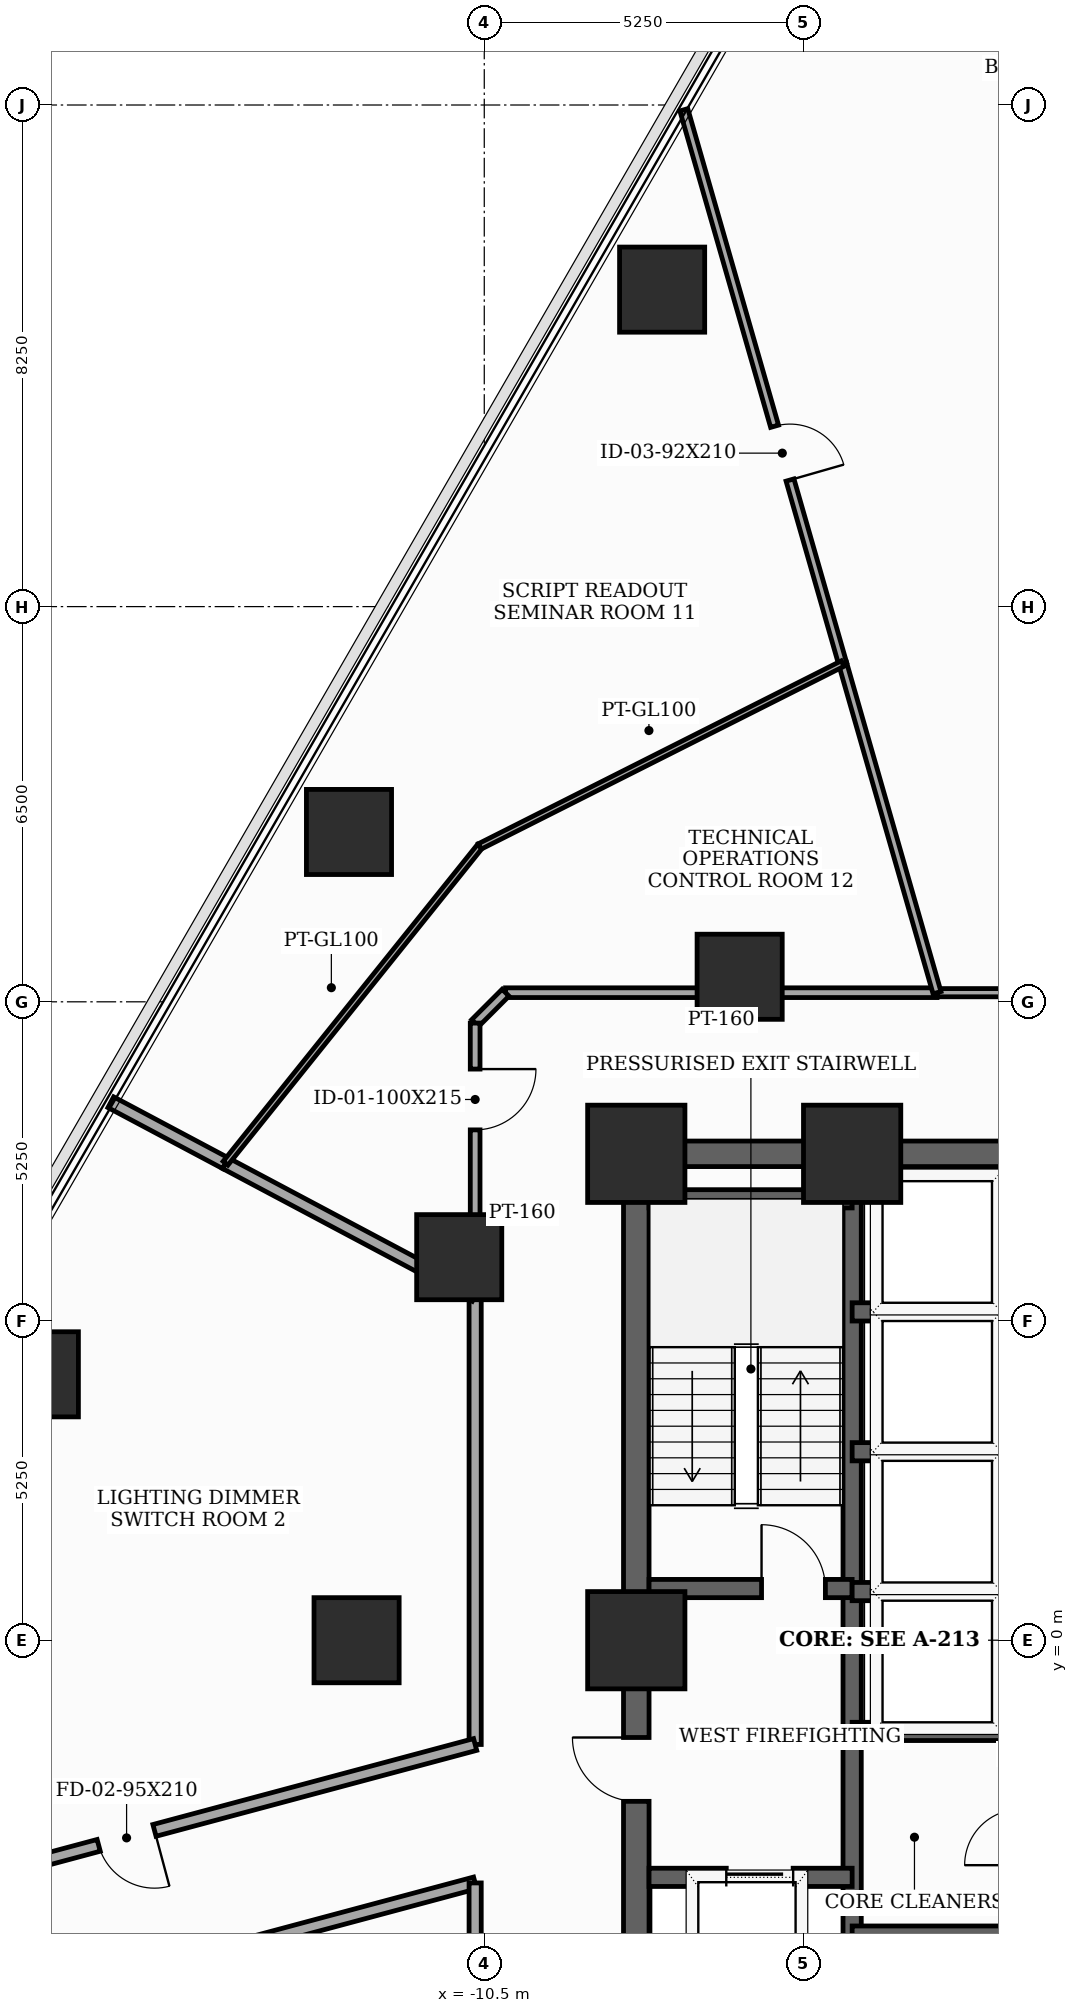
"""IFC4 building model, lengths in metres.
Left out: names, types, materials, properties, quantities, classifications, styles, units other than length and angle.
Written with IfcOpenShell. Run it as: python <this file> out.ifc"""

import sys

from ifc_helpers import new_model, si_unit, direction, frame, frame_2d, origin, origin_2d, place, context, subcontext, project, spatial, rectangle, extrude, element, fill, save


model = new_model("IFC4")
c1 = context("Model", 3, precision=1e-05, world=origin(), true_north=direction((0.0, 1.0)))
c2 = subcontext(c1, "Body", "Model", "MODEL_VIEW")
j1 = project(units=[si_unit("LENGTHUNIT", "METRE"), si_unit("PLANEANGLEUNIT", "RADIAN")], contexts=[c1])
p1 = place(None, origin())
s1 = spatial("IfcSite", under=j1, at=p1, CompositionType="ELEMENT")
p2 = place(p1, origin())
s2 = spatial("IfcBuilding", under=s1, at=p2, CompositionType="ELEMENT")
p3 = place(p2, frame((0.0, 0.0, 40.8)))
s3 = spatial("IfcBuildingStorey", under=s2, at=p3, CompositionType="ELEMENT", Elevation=40.8)
for number, where, z_axis, x_axis in (
    (1, (-4.45, 8.0, 0.0), (0.0, 0.0, 1.0), (1.0, 0.0, 0.0)),
    (2, (-8.0, 8.0, 0.0), (0.0, 0.0, 1.0), (1.0, 0.0, 0.0)),
    (3, (-8.0, 0.0, 0.0), (0.0, 0.0, 1.0), (1.0, 0.0, 0.0)),
):
    element("IfcColumn", number, at=place(p3, frame(where, z_axis=z_axis, x_axis=x_axis)), inside=s3, PredefinedType="COLUMN", context=c2, shape_type="SweptSolid", body=[
        extrude(rectangle(XDim=1.6, YDim=1.6, at=origin_2d()), origin(), (0.0, 0.0, 1.0), 3.7),
    ])
for number, where, z_axis, x_axis in (
    (4, (-6.3, 10.912, 0.0), (0.0, 0.0, 1.0), (1.0, 0.0, 0.0)),
    (5, (-10.912, 6.3, 0.0), (0.0, 0.0, 1.0), (1.0, 0.0, 0.0)),
    (6, (-12.6, 0.0, 0.0), (0.0, 0.0, 1.0), (1.0, 0.0, 0.0)),
    (7, (-7.575, 22.213, 0.0), (0.0, 0.0, 1.0), (1.0, 0.0, 0.0)),
    (8, (-12.725, 13.293, 0.0), (0.0, 0.0, 1.0), (1.0, 0.0, 0.0)),
    (9, (-17.875, 4.373, 0.0), (0.0, 0.0, 1.0), (1.0, 0.0, 0.0)),
):
    element("IfcColumn", number, at=place(p3, frame(where, z_axis=z_axis, x_axis=x_axis)), inside=s3, PredefinedType="COLUMN", context=c2, shape_type="SweptSolid", body=[
        extrude(rectangle(XDim=1.4, YDim=1.4, at=origin_2d()), origin(), (0.0, 0.0, 1.0), 3.7),
    ])
p4 = place(p3, frame((-8.0, -8.0, 0.0), z_axis=(0.0, 0.0, 1.0), x_axis=(0.0, 1.0, 0.0)))
e10 = element("IfcWall", 10, at=p4, inside=s3, PredefinedType="SHEAR", context=c2, shape_type="SweptSolid", body=[
    extrude(rectangle(XDim=16.0, YDim=0.42, at=frame_2d((8.0, 0.0))), origin(), (0.0, 0.0, 1.0), 3.5),
])
p5 = place(p4, frame((1.002, 0.0, 0.0)))
e11 = element("IfcOpeningElement", 11, at=p5, cuts=e10, PredefinedType="OPENING", context=c2, shape_type="SweptSolid", body=[
    extrude(rectangle(XDim=0.85, YDim=2.02, at=frame_2d((0.425, 1.01))), frame((0.0, 0.22, 0.0), z_axis=(0.0, -1.0, 0.0), x_axis=(1.0, 0.0, 0.0)), (0.0, 0.0, 1.0), 0.44),
])
p6 = place(p4, frame((5.35, 0.0, 0.0)))
e12 = element("IfcOpeningElement", 12, at=p6, cuts=e10, PredefinedType="OPENING", context=c2, shape_type="SweptSolid", body=[
    extrude(rectangle(XDim=1.05, YDim=2.15, at=frame_2d((0.525, 1.075))), frame((0.0, 0.22, 0.0), z_axis=(0.0, -1.0, 0.0), x_axis=(1.0, 0.0, 0.0)), (0.0, 0.0, 1.0), 0.44),
])
p7 = place(p3, frame((-8.0, 8.0, 0.0), z_axis=(0.0, 0.0, 1.0), x_axis=(1.0, 0.0, 0.0)))
e13 = element("IfcWall", 13, at=p7, inside=s3, PredefinedType="SHEAR", context=c2, shape_type="SweptSolid", body=[
    extrude(rectangle(XDim=16.0, YDim=0.42, at=frame_2d((8.0, 0.0))), origin(), (0.0, 0.0, 1.0), 3.5),
])
p8 = place(p7, frame((7.1, 0.0, 0.0)))
e14 = element("IfcOpeningElement", 14, at=p8, cuts=e13, PredefinedType="OPENING", context=c2, shape_type="SweptSolid", body=[
    extrude(rectangle(XDim=1.8, YDim=2.15, at=frame_2d((0.9, 1.075))), frame((0.0, 0.22, 0.0), z_axis=(0.0, -1.0, 0.0), x_axis=(1.0, 0.0, 0.0)), (0.0, 0.0, 1.0), 0.44),
])
p9 = place(p3, frame((-4.45, -7.79, 0.0), z_axis=(0.0, 0.0, 1.0), x_axis=(0.0, 1.0, 0.0)))
e15 = element("IfcWall", 15, at=p9, inside=s3, PredefinedType="SHEAR", context=c2, shape_type="SweptSolid", body=[
    extrude(rectangle(XDim=15.58, YDim=0.3, at=frame_2d((7.79, 0.0))), origin(), (0.0, 0.0, 1.0), 3.5),
])
p10 = place(p3, frame((-7.79, 0.85, 0.0), z_axis=(0.0, 0.0, 1.0), x_axis=(1.0, 0.0, 0.0)))
e16 = element("IfcWall", 16, at=p10, inside=s3, PredefinedType="SHEAR", context=c2, shape_type="SweptSolid", body=[
    extrude(rectangle(XDim=3.34, YDim=0.3, at=frame_2d((1.67, 0.0))), origin(), (0.0, 0.0, 1.0), 3.5),
])
p11 = place(p10, frame((1.85, 0.0, 0.0)))
e17 = element("IfcOpeningElement", 17, at=p11, cuts=e16, PredefinedType="OPENING", context=c2, shape_type="SweptSolid", body=[
    extrude(rectangle(XDim=1.05, YDim=2.15, at=frame_2d((0.525, 1.075))), frame((0.0, 0.16, 0.0), z_axis=(0.0, -1.0, 0.0), x_axis=(1.0, 0.0, 0.0)), (0.0, 0.0, 1.0), 0.32),
])
p12 = place(p3, frame((-7.79, 7.26, 0.0), z_axis=(0.0, 0.0, 1.0), x_axis=(1.0, 0.0, 0.0)))
e18 = element("IfcWall", 18, at=p12, inside=s3, PredefinedType="SHEAR", context=c2, shape_type="SweptSolid", body=[
    extrude(rectangle(XDim=3.34, YDim=0.3, at=frame_2d((1.67, 0.0))), origin(), (0.0, 0.0, 1.0), 3.5),
])
p13 = place(p3, frame((-7.79, -3.9, 0.0), z_axis=(0.0, 0.0, 1.0), x_axis=(1.0, 0.0, 0.0)))
e19 = element("IfcWall", 19, at=p13, inside=s3, PredefinedType="SHEAR", context=c2, shape_type="SweptSolid", body=[
    extrude(rectangle(XDim=3.34, YDim=0.3, at=frame_2d((1.67, 0.0))), origin(), (0.0, 0.0, 1.0), 3.5),
])
p14 = place(p13, frame((1.27, 0.0, 0.0)))
e20 = element("IfcOpeningElement", 20, at=p14, cuts=e19, PredefinedType="OPENING", context=c2, shape_type="SweptSolid", body=[
    extrude(rectangle(XDim=1.1, YDim=2.1, at=frame_2d((0.55, 1.05))), frame((0.0, 0.16, 0.0), z_axis=(0.0, -1.0, 0.0), x_axis=(1.0, 0.0, 0.0)), (0.0, 0.0, 1.0), 0.32),
])
p15 = place(p3, frame((-4.45, -4.85, 0.0), z_axis=(0.0, 0.0, 1.0), x_axis=(1.0, 0.0, 0.0)))
e21 = element("IfcWall", 21, at=p15, inside=s3, PredefinedType="SHEAR", context=c2, shape_type="SweptSolid", body=[
    extrude(rectangle(XDim=8.9, YDim=0.3, at=frame_2d((4.45, 0.0))), origin(), (0.0, 0.0, 1.0), 3.5),
])
for number, where, z_axis, x_axis in (
    (22, (-4.45, -1.5, 0.0), (0.0, 0.0, 1.0), (1.0, 0.0, 0.0)),
    (23, (-4.45, 0.8, 0.0), (0.0, 0.0, 1.0), (1.0, 0.0, 0.0)),
    (24, (-4.45, 3.1, 0.0), (0.0, 0.0, 1.0), (1.0, 0.0, 0.0)),
    (25, (-4.45, 5.4, 0.0), (0.0, 0.0, 1.0), (1.0, 0.0, 0.0)),
):
    element("IfcWall", number, at=place(p3, frame(where, z_axis=z_axis, x_axis=x_axis)), inside=s3, PredefinedType="SHEAR", context=c2, shape_type="SweptSolid", body=[
        extrude(rectangle(XDim=2.77, YDim=0.3, at=frame_2d((1.385, 0.0))), origin(), (0.0, 0.0, 1.0), 3.5),
    ])
p16 = place(p3, frame((1.715, 10.65, 0.0), z_axis=(0.0, 0.0, 1.0), x_axis=(-1.0, 0.0, 0.0)))
e26 = element("IfcWall", 26, at=p16, inside=s3, PredefinedType="PARTITIONING", context=c2, shape_type="SweptSolid", body=[
    extrude(rectangle(XDim=4.769, YDim=0.135, at=frame_2d((2.385, 0.0))), origin(), (0.0, 0.0, 1.0), 2.785),
])
p17 = place(p3, frame((-10.65, 5.663, 0.0), z_axis=(0.0, 0.0, 1.0), x_axis=(0.0, -1.0, 0.0)))
e27 = element("IfcWall", 27, at=p17, inside=s3, PredefinedType="SOLIDWALL", context=c2, shape_type="SweptSolid", body=[
    extrude(rectangle(XDim=7.378, YDim=0.2, at=frame_2d((3.689, 0.0))), origin(), (0.0, 0.0, 1.0), 2.785),
])
p18 = place(p3, frame((-10.65, -1.715, 0.0), z_axis=(0.0, 0.0, 1.0), x_axis=(-0.965926659449, -0.258815935688, 0.0)))
e28 = element("IfcWall", 28, at=p18, inside=s3, PredefinedType="SOLIDWALL", context=c2, shape_type="SweptSolid", body=[
    extrude(rectangle(XDim=11.87, YDim=0.2, at=frame_2d((5.935, 0.0))), origin(), (0.0, 0.0, 1.0), 2.785),
])
p19 = place(p18, frame((5.46, 0.0, 0.0)))
e29 = element("IfcOpeningElement", 29, at=p19, cuts=e28, PredefinedType="OPENING", context=c2, shape_type="SweptSolid", body=[
    extrude(rectangle(XDim=0.95, YDim=2.1, at=frame_2d((0.475, 1.05))), frame((0.0, 0.11, 0.0), z_axis=(0.0, -1.0, 0.0), x_axis=(1.0, 0.0, 0.0)), (0.0, 0.0, 1.0), 0.22),
])
p20 = place(p3, frame((-21.545, -6.912, 0.0), z_axis=(0.0, 0.0, 1.0), x_axis=(0.965906888357, 0.258889712088, 0.0)))
e30 = element("IfcWall", 30, at=p20, inside=s3, PredefinedType="SOLIDWALL", context=c2, shape_type="SweptSolid", body=[
    extrude(rectangle(XDim=11.28, YDim=0.2, at=frame_2d((5.64, 0.0))), origin(), (0.0, 0.0, 1.0), 2.785),
])
p21 = place(p3, frame((-10.65, -3.992, 0.0), z_axis=(0.0, 0.0, 1.0), x_axis=(0.0, -1.0, 0.0)))
e31 = element("IfcWall", 31, at=p21, inside=s3, PredefinedType="SOLIDWALL", context=c2, shape_type="SweptSolid", body=[
    extrude(rectangle(XDim=3.746, YDim=0.2, at=frame_2d((1.873, 0.0))), origin(), (0.0, 0.0, 1.0), 2.785),
])
p22 = place(p3, frame((-3.054, 10.65, 0.0), z_axis=(0.0, 0.0, 1.0), x_axis=(-1.0, 0.0, 0.0)))
e32 = element("IfcWall", 32, at=p22, inside=s3, PredefinedType="PARTITIONING", context=c2, shape_type="SweptSolid", body=[
    extrude(rectangle(XDim=7.096, YDim=0.16, at=frame_2d((3.548, 0.0))), origin(), (0.0, 0.0, 1.0), 2.685),
])
p23 = place(p3, frame((-10.15, 10.65, 0.0), z_axis=(0.0, 0.0, 1.0), x_axis=(-0.707106781187, -0.707106781187, 0.0)))
e33 = element("IfcWall", 33, at=p23, inside=s3, PredefinedType="PARTITIONING", context=c2, shape_type="SweptSolid", body=[
    extrude(rectangle(XDim=0.707, YDim=0.16, at=frame_2d((0.354, 0.0))), origin(), (0.0, 0.0, 1.0), 3.5),
])
p24 = place(p3, frame((-10.65, 10.15, 0.0), z_axis=(0.0, 0.0, 1.0), x_axis=(0.0, -1.0, 0.0)))
e34 = element("IfcWall", 34, at=p24, inside=s3, PredefinedType="PARTITIONING", context=c2, shape_type="SweptSolid", body=[
    extrude(rectangle(XDim=4.487, YDim=0.16, at=frame_2d((2.243, 0.0))), origin(), (0.0, 0.0, 1.0), 2.785),
])
p25 = place(p24, frame((0.756, 0.0, 0.0)))
e35 = element("IfcOpeningElement", 35, at=p25, cuts=e34, PredefinedType="OPENING", context=c2, shape_type="SweptSolid", body=[
    extrude(rectangle(XDim=1.0, YDim=2.15, at=frame_2d((0.5, 1.075))), frame((0.0, 0.09, 0.0), z_axis=(0.0, -1.0, 0.0), x_axis=(1.0, 0.0, 0.0)), (0.0, 0.0, 1.0), 0.18),
])
p26 = place(p3, frame((-7.218, 25.171, 0.0), z_axis=(0.0, 0.0, 1.0), x_axis=(0.275694254482, -0.961245378686, 0.0)))
e36 = element("IfcWall", 36, at=p26, inside=s3, PredefinedType="PARTITIONING", context=c2, shape_type="SweptSolid", body=[
    extrude(rectangle(XDim=9.475, YDim=0.135, at=frame_2d((4.738, 0.0))), origin(), (0.0, 0.0, 1.0), 2.935),
])
p27 = place(p26, frame((5.415, 0.0, 0.0)))
e37 = element("IfcOpeningElement", 37, at=p27, cuts=e36, PredefinedType="OPENING", context=c2, shape_type="SweptSolid", body=[
    extrude(rectangle(XDim=0.92, YDim=2.1, at=frame_2d((0.46, 1.05))), frame((0.0, 0.077, 0.0), z_axis=(0.0, -1.0, 0.0), x_axis=(1.0, 0.0, 0.0)), (0.0, 0.0, 1.0), 0.155),
])
p28 = place(p3, frame((-4.606, 16.063, 0.0), z_axis=(0.0, 0.0, 1.0), x_axis=(0.275608564, -0.961269951392, 0.0)))
e38 = element("IfcWall", 38, at=p28, inside=s3, PredefinedType="PARTITIONING", context=c2, shape_type="SweptSolid", body=[
    extrude(rectangle(XDim=5.631, YDim=0.135, at=frame_2d((2.815, 0.0))), origin(), (0.0, 0.0, 1.0), 2.785),
])
p29 = place(p3, frame((-14.755, 7.845, 0.0), z_axis=(0.0, 0.0, 1.0), x_axis=(-0.882905636776, 0.469550462197, 0.0)))
e39 = element("IfcWall", 39, at=p29, inside=s3, PredefinedType="SOLIDWALL", context=c2, shape_type="SweptSolid", body=[
    extrude(rectangle(XDim=2.137, YDim=0.2, at=frame_2d((1.069, 0.0))), origin(), (0.0, 0.0, 1.0), 2.935),
])
p30 = place(p3, frame((-10.65, 5.663, 0.0), z_axis=(0.0, 0.0, 1.0), x_axis=(-0.883016425854, 0.46934208385, 0.0)))
e40 = element("IfcWall", 40, at=p30, inside=s3, PredefinedType="SOLIDWALL", context=c2, shape_type="SweptSolid", body=[
    extrude(rectangle(XDim=4.649, YDim=0.2, at=frame_2d((2.324, 0.0))), origin(), (0.0, 0.0, 1.0), 2.785),
])
p31 = place(p3, frame((-14.755, 7.845, 0.0), z_axis=(0.0, 0.0, 1.0), x_axis=(0.625893000506, 0.779908938222, 0.0)))
e41 = element("IfcWall", 41, at=p31, inside=s3, PredefinedType="MOVABLE", context=c2, shape_type="SweptSolid", body=[
    extrude(rectangle(XDim=6.681, YDim=0.1, at=frame_2d((3.341, 0.0))), origin(), (0.0, 0.0, 1.0), 2.685),
])
p32 = place(p3, frame((-10.573, 13.056, 0.0), z_axis=(0.0, 0.0, 1.0), x_axis=(0.893012396789, 0.450032064615, 0.0)))
e42 = element("IfcWall", 42, at=p32, inside=s3, PredefinedType="MOVABLE", context=c2, shape_type="SweptSolid", body=[
    extrude(rectangle(XDim=6.682, YDim=0.1, at=frame_2d((3.341, 0.0))), origin(), (0.0, 0.0, 1.0), 2.685),
])
p33 = place(p6, origin())
e43 = element("IfcDoor", 43, at=p33, inside=s3, OperationType="SINGLE_SWING_RIGHT", PredefinedType="DOOR", context=c2, shape_type="SweptSolid", body=[
    extrude(rectangle(XDim=1.05, YDim=2.15, at=frame_2d((0.525, 1.075))), frame((0.0, 0.025, 0.0), z_axis=(0.0, -1.0, 0.0), x_axis=(1.0, 0.0, 0.0)), (0.0, 0.0, 1.0), 0.05),
])
fill(e12, e43)
p34 = place(p11, origin())
e44 = element("IfcDoor", 44, at=p34, inside=s3, OperationType="SINGLE_SWING_LEFT", PredefinedType="DOOR", context=c2, shape_type="SweptSolid", body=[
    extrude(rectangle(XDim=1.05, YDim=2.15, at=frame_2d((0.525, 1.075))), frame((0.0, 0.025, 0.0), z_axis=(0.0, -1.0, 0.0), x_axis=(1.0, 0.0, 0.0)), (0.0, 0.0, 1.0), 0.05),
])
fill(e17, e44)
p35 = place(p14, origin())
e45 = element("IfcDoor", 45, at=p35, inside=s3, OperationType="SLIDING_TO_LEFT", PredefinedType="DOOR", context=c2, shape_type="SweptSolid", body=[
    extrude(rectangle(XDim=1.1, YDim=2.1, at=frame_2d((0.55, 1.05))), frame((0.0, 0.025, 0.0), z_axis=(0.0, -1.0, 0.0), x_axis=(1.0, 0.0, 0.0)), (0.0, 0.0, 1.0), 0.05),
])
fill(e20, e45)
p36 = place(p19, origin())
e46 = element("IfcDoor", 46, at=p36, inside=s3, OperationType="SINGLE_SWING_LEFT", PredefinedType="DOOR", context=c2, shape_type="SweptSolid", body=[
    extrude(rectangle(XDim=0.95, YDim=2.1, at=frame_2d((0.475, 1.05))), frame((0.0, 0.025, 0.0), z_axis=(0.0, -1.0, 0.0), x_axis=(1.0, 0.0, 0.0)), (0.0, 0.0, 1.0), 0.05),
])
fill(e29, e46)
p37 = place(p25, origin())
e47 = element("IfcDoor", 47, at=p37, inside=s3, OperationType="SINGLE_SWING_LEFT", PredefinedType="DOOR", context=c2, shape_type="SweptSolid", body=[
    extrude(rectangle(XDim=1.0, YDim=2.15, at=frame_2d((0.5, 1.075))), frame((0.0, 0.025, 0.0), z_axis=(0.0, -1.0, 0.0), x_axis=(1.0, 0.0, 0.0)), (0.0, 0.0, 1.0), 0.05),
])
fill(e35, e47)
p38 = place(p27, origin())
e48 = element("IfcDoor", 48, at=p38, inside=s3, OperationType="SINGLE_SWING_RIGHT", PredefinedType="DOOR", context=c2, shape_type="SweptSolid", body=[
    extrude(rectangle(XDim=0.92, YDim=2.1, at=frame_2d((0.46, 1.05))), frame((0.0, 0.025, 0.0), z_axis=(0.0, -1.0, 0.0), x_axis=(1.0, 0.0, 0.0)), (0.0, 0.0, 1.0), 0.05),
])
fill(e37, e48)
save(model, sys.argv[1])
